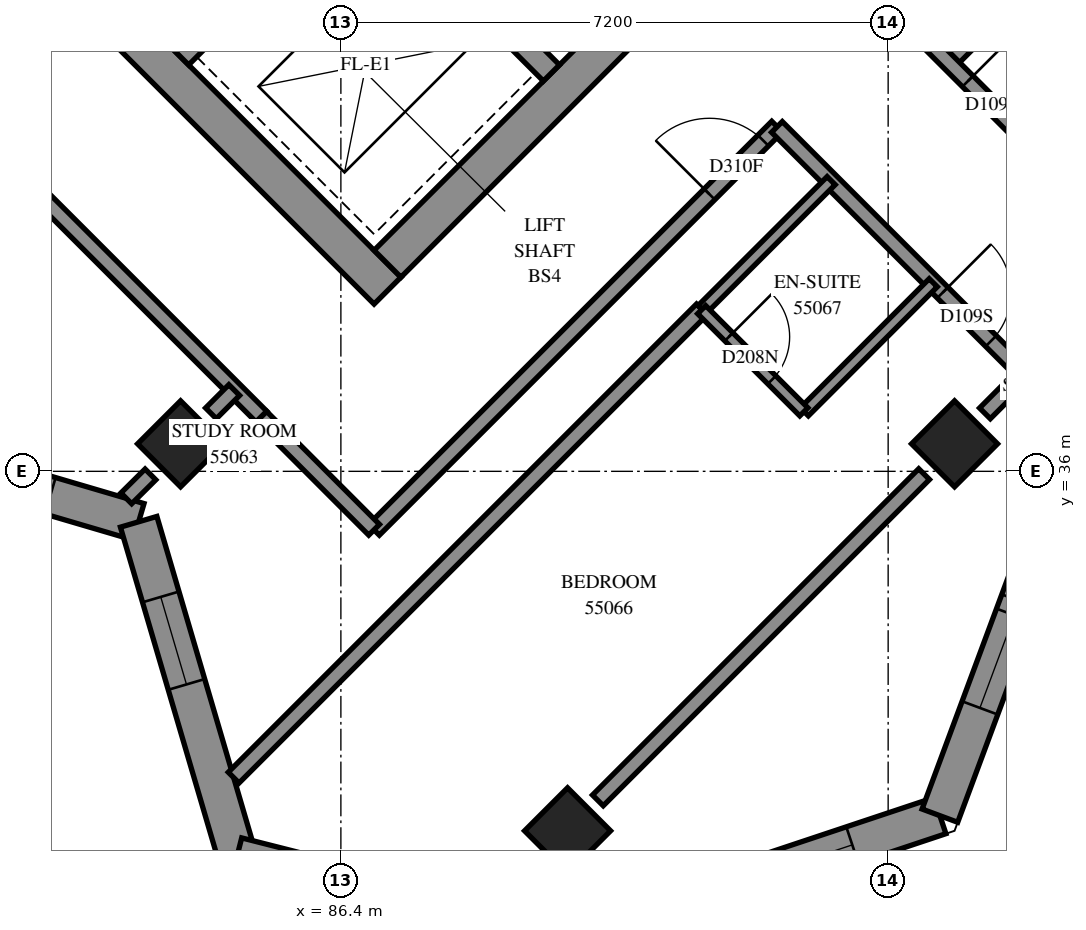
"""IFC4 building model, lengths in metres.
Left out: names, types, materials, properties, quantities, classifications, styles, units other than length and angle.
Written with IfcOpenShell. Run it as: python <this file> out.ifc"""

import sys

from ifc_helpers import new_model, si_unit, direction, frame, frame_2d, origin, origin_2d, place, context, subcontext, project, spatial, polyline, rectangle, outline, extrude, element, fill, save


model = new_model("IFC4")
c1 = context("Model", 3, precision=1e-05, world=origin(), true_north=direction((0.0, 1.0)))
c2 = subcontext(c1, "Body", "Model", "MODEL_VIEW")
j1 = project(units=[si_unit("LENGTHUNIT", "METRE"), si_unit("PLANEANGLEUNIT", "RADIAN")], contexts=[c1])
p1 = place(None, origin())
s1 = spatial("IfcSite", under=j1, at=p1, CompositionType="ELEMENT")
p2 = place(p1, origin())
s2 = spatial("IfcBuilding", under=s1, at=p2, CompositionType="ELEMENT")
p3 = place(p2, frame((0.0, 0.0, 203.2)))
s3 = spatial("IfcBuildingStorey", under=s2, at=p3, CompositionType="ELEMENT", Elevation=203.2)
for number, where, z_axis, x_axis in (
    (1, (84.291, 36.362, 0.0), (0.0, 0.0, 1.0), (0.707, -0.707, 0.0)),
    (2, (94.474, 36.362, 0.0), (0.0, 0.0, 1.0), (0.707, -0.707, 0.0)),
    (3, (89.382, 31.271, 0.0), (0.0, 0.0, 1.0), (0.707, -0.707, 0.0)),
):
    element("IfcColumn", number, at=place(p3, frame(where, z_axis=z_axis, x_axis=x_axis)), inside=s3, PredefinedType="COLUMN", context=c2, shape_type="SweptSolid", body=[
        extrude(rectangle(XDim=0.8, YDim=0.8, at=origin_2d()), origin(), (0.0, 0.0, 1.0), 3.1),
    ])
p4 = place(p3, frame((76.124, 49.267, -0.3), z_axis=(0.0, 0.0, 1.0), x_axis=(0.7071067812, -0.7071067812, 0.0)))
e4 = element("IfcWall", 4, at=p4, inside=s3, PredefinedType="SHEAR", context=c2, shape_type="SweptSolid", body=[
    extrude(rectangle(XDim=15.4, YDim=0.5, at=frame_2d((7.7, 0.0))), origin(), (0.0, 0.0, 1.0), 2.7),
])
p5 = place(p3, frame((87.013, 38.731, -0.3), z_axis=(0.0, 0.0, 1.0), x_axis=(0.7071067812, 0.7071067812, 0.0)))
e5 = element("IfcWall", 5, at=p5, inside=s3, PredefinedType="SHEAR", context=c2, shape_type="SweptSolid", body=[
    extrude(rectangle(XDim=14.4, YDim=0.5, at=frame_2d((7.2, 0.0))), origin(), (0.0, 0.0, 1.0), 2.7),
])
p6 = place(p5, frame((4.55, 0.0, 0.3)))
e6 = element("IfcOpeningElement", 6, at=p6, cuts=e5, PredefinedType="OPENING", context=c2, shape_type="SweptSolid", body=[
    extrude(rectangle(XDim=1.1, YDim=2.1, at=frame_2d((0.55, 1.05))), frame((0.0, 0.26, 0.0), z_axis=(0.0, -1.0, 0.0), x_axis=(1.0, 0.0, 0.0)), (0.0, 0.0, 1.0), 0.52),
])
p7 = place(p5, frame((11.35, 0.0, 0.3)))
e7 = element("IfcOpeningElement", 7, at=p7, cuts=e5, PredefinedType="OPENING", context=c2, shape_type="SweptSolid", body=[
    extrude(rectangle(XDim=1.1, YDim=2.1, at=frame_2d((0.55, 1.05))), frame((0.0, 0.26, 0.0), z_axis=(0.0, -1.0, 0.0), x_axis=(1.0, 0.0, 0.0)), (0.0, 0.0, 1.0), 0.52),
])
p8 = place(p3, frame((84.291, 41.453, 0.0), z_axis=(0.0, 0.0, 1.0), x_axis=(0.7071067812, 0.7071067812, 0.0)))
e8 = element("IfcWall", 8, at=p8, inside=s3, PredefinedType="SOLIDWALL", context=c2, shape_type="SweptSolid", body=[
    extrude(rectangle(XDim=3.3, YDim=0.3, at=frame_2d((1.65, 0.0))), origin(), (0.0, 0.0, 1.0), 3.1),
])
p9 = place(p3, frame((78.988, 51.423, 0.0), z_axis=(0.0, 0.0, 1.0), x_axis=(0.7071067812, -0.7071067812, 0.0)))
e9 = element("IfcWall", 9, at=p9, inside=s3, PredefinedType="SOLIDWALL", context=c2, shape_type="SweptSolid", body=[
    extrude(rectangle(XDim=14.4, YDim=0.3, at=frame_2d((7.2, 0.0))), origin(), (0.0, 0.0, 1.0), 3.1),
])
p10 = place(p9, frame((1.35, 0.0, 0.0)))
e10 = element("IfcOpeningElement", 10, at=p10, cuts=e9, PredefinedType="OPENING", context=c2, shape_type="SweptSolid", body=[
    extrude(rectangle(XDim=0.9, YDim=2.1, at=frame_2d((0.45, 1.05))), frame((0.0, 0.16, 0.0), z_axis=(0.0, -1.0, 0.0), x_axis=(1.0, 0.0, 0.0)), (0.0, 0.0, 1.0), 0.32),
])
p11 = place(p9, frame((4.95, 0.0, 0.0)))
e11 = element("IfcOpeningElement", 11, at=p11, cuts=e9, PredefinedType="OPENING", context=c2, shape_type="SweptSolid", body=[
    extrude(rectangle(XDim=0.9, YDim=2.1, at=frame_2d((0.45, 1.05))), frame((0.0, 0.16, 0.0), z_axis=(0.0, -1.0, 0.0), x_axis=(1.0, 0.0, 0.0)), (0.0, 0.0, 1.0), 0.32),
])
p12 = place(p9, frame((8.55, 0.0, 0.0)))
e12 = element("IfcOpeningElement", 12, at=p12, cuts=e9, PredefinedType="OPENING", context=c2, shape_type="SweptSolid", body=[
    extrude(rectangle(XDim=0.9, YDim=2.1, at=frame_2d((0.45, 1.05))), frame((0.0, 0.16, 0.0), z_axis=(0.0, -1.0, 0.0), x_axis=(1.0, 0.0, 0.0)), (0.0, 0.0, 1.0), 0.32),
])
p13 = place(p9, frame((12.05, 0.0, 0.0)))
e13 = element("IfcOpeningElement", 13, at=p13, cuts=e9, PredefinedType="OPENING", context=c2, shape_type="SweptSolid", body=[
    extrude(rectangle(XDim=1.1, YDim=2.1, at=frame_2d((0.55, 1.05))), frame((0.0, 0.16, 0.0), z_axis=(0.0, -1.0, 0.0), x_axis=(1.0, 0.0, 0.0)), (0.0, 0.0, 1.0), 0.32),
])
p14 = place(p3, frame((89.373, 29.834, 0.0), z_axis=(0.0, 0.0, 1.0), x_axis=(0.9486832981, 0.316227766, 0.0)))
e14 = element("IfcWall", 14, at=p14, inside=s3, PredefinedType="SOLIDWALL", context=c2, shape_type="SweptSolid", body=[
    extrude(outline(polyline([(-0.073, -0.25), (5.293, -0.25), (5.054, 0.25), (0.073, 0.25), (-0.073, -0.25)])), origin(), (0.0, 0.0, 1.0), 3.1),
])
p15 = place(p14, frame((1.159, 0.0, 0.45)))
e15 = element("IfcOpeningElement", 15, at=p15, cuts=e14, PredefinedType="OPENING", context=c2, shape_type="SweptSolid", body=[
    extrude(rectangle(XDim=1.3, YDim=2.5, at=frame_2d((0.65, 1.25))), frame((0.0, 0.26, 0.0), z_axis=(0.0, -1.0, 0.0), x_axis=(1.0, 0.0, 0.0)), (0.0, 0.0, 1.0), 0.52),
])
p16 = place(p14, frame((2.659, 0.0, 0.45)))
e16 = element("IfcOpeningElement", 16, at=p16, cuts=e14, PredefinedType="OPENING", context=c2, shape_type="SweptSolid", body=[
    extrude(rectangle(XDim=1.3, YDim=2.5, at=frame_2d((0.65, 1.25))), frame((0.0, 0.26, 0.0), z_axis=(0.0, -1.0, 0.0), x_axis=(1.0, 0.0, 0.0)), (0.0, 0.0, 1.0), 0.52),
])
p17 = place(p3, frame((94.281, 31.47, 0.0), z_axis=(0.0, 0.0, 1.0), x_axis=(0.3481903374, 0.9374238577, 0.0)))
e17 = element("IfcWall", 17, at=p17, inside=s3, PredefinedType="SOLIDWALL", context=c2, shape_type="SweptSolid", body=[
    extrude(outline(polyline([(-0.12, -0.25), (5.16, -0.25), (5.39, 0.25), (0.12, 0.25), (-0.12, -0.25)])), origin(), (0.0, 0.0, 1.0), 3.1),
])
p18 = place(p17, frame((1.512, 0.0, 0.45)))
e18 = element("IfcOpeningElement", 18, at=p18, cuts=e17, PredefinedType="OPENING", context=c2, shape_type="SweptSolid", body=[
    extrude(rectangle(XDim=1.3, YDim=2.5, at=frame_2d((0.65, 1.25))), frame((0.0, 0.26, 0.0), z_axis=(0.0, -1.0, 0.0), x_axis=(1.0, 0.0, 0.0)), (0.0, 0.0, 1.0), 0.52),
])
p19 = place(p17, frame((3.012, 0.0, 0.45)))
e19 = element("IfcOpeningElement", 19, at=p19, cuts=e17, PredefinedType="OPENING", context=c2, shape_type="SweptSolid", body=[
    extrude(rectangle(XDim=1.3, YDim=2.5, at=frame_2d((0.65, 1.25))), frame((0.0, 0.26, 0.0), z_axis=(0.0, -1.0, 0.0), x_axis=(1.0, 0.0, 0.0)), (0.0, 0.0, 1.0), 0.52),
])
p20 = place(p3, frame((79.338, 36.63, 0.0), z_axis=(0.0, 0.0, 1.0), x_axis=(0.9593974303, -0.2820577435, 0.0)))
e20 = element("IfcWall", 20, at=p20, inside=s3, PredefinedType="SOLIDWALL", context=c2, shape_type="SweptSolid", body=[
    extrude(outline(polyline([(-0.142, -0.25), (4.451, -0.25), (4.724, 0.25), (0.142, 0.25), (-0.142, -0.25)])), origin(), (0.0, 0.0, 1.0), 3.1),
])
p21 = place(p20, frame((0.575, 0.0, 0.45)))
e21 = element("IfcOpeningElement", 21, at=p21, cuts=e20, PredefinedType="OPENING", context=c2, shape_type="SweptSolid", body=[
    extrude(rectangle(XDim=1.3, YDim=2.5, at=frame_2d((0.65, 1.25))), frame((0.0, 0.26, 0.0), z_axis=(0.0, -1.0, 0.0), x_axis=(1.0, 0.0, 0.0)), (0.0, 0.0, 1.0), 0.52),
])
p22 = place(p20, frame((2.075, 0.0, 0.45)))
e22 = element("IfcOpeningElement", 22, at=p22, cuts=e20, PredefinedType="OPENING", context=c2, shape_type="SweptSolid", body=[
    extrude(rectangle(XDim=1.3, YDim=2.5, at=frame_2d((0.65, 1.25))), frame((0.0, 0.26, 0.0), z_axis=(0.0, -1.0, 0.0), x_axis=(1.0, 0.0, 0.0)), (0.0, 0.0, 1.0), 0.52),
])
p23 = place(p3, frame((83.74, 35.336, 0.0), z_axis=(0.0, 0.0, 1.0), x_axis=(0.2820577435, -0.9593974303, 0.0)))
e23 = element("IfcWall", 23, at=p23, inside=s3, PredefinedType="SOLIDWALL", context=c2, shape_type="SweptSolid", body=[
    extrude(outline(polyline([(0.136, -0.25), (4.73, -0.25), (4.445, 0.25), (-0.136, 0.25), (0.136, -0.25)])), origin(), (0.0, 0.0, 1.0), 3.1),
])
p24 = place(p23, frame((1.03, 0.0, 0.45)))
e24 = element("IfcOpeningElement", 24, at=p24, cuts=e23, PredefinedType="OPENING", context=c2, shape_type="SweptSolid", body=[
    extrude(rectangle(XDim=1.2, YDim=2.5, at=frame_2d((0.6, 1.25))), frame((0.0, 0.26, 0.0), z_axis=(0.0, -1.0, 0.0), x_axis=(1.0, 0.0, 0.0)), (0.0, 0.0, 1.0), 0.52),
])
p25 = place(p3, frame((85.034, 30.935, 0.0), z_axis=(0.0, 0.0, 1.0), x_axis=(0.9692704293, -0.2459976318, 0.0)))
e25 = element("IfcWall", 25, at=p25, inside=s3, PredefinedType="SOLIDWALL", context=c2, shape_type="SweptSolid", body=[
    extrude(outline(polyline([(-0.142, -0.25), (4.55, -0.25), (4.404, 0.25), (0.142, 0.25), (-0.142, -0.25)])), origin(), (0.0, 0.0, 1.0), 3.1),
])
p26 = place(p25, frame((2.107, 0.0, 0.45)))
e26 = element("IfcOpeningElement", 26, at=p26, cuts=e25, PredefinedType="OPENING", context=c2, shape_type="SweptSolid", body=[
    extrude(rectangle(XDim=1.2, YDim=2.5, at=frame_2d((0.6, 1.25))), frame((0.0, 0.26, 0.0), z_axis=(0.0, -1.0, 0.0), x_axis=(1.0, 0.0, 0.0)), (0.0, 0.0, 1.0), 0.52),
])
p27 = place(p3, frame((84.99, 31.971, 0.0), z_axis=(0.0, 0.0, 1.0), x_axis=(0.7071067812, 0.7071067812, 0.0)))
e27 = element("IfcWall", 27, at=p27, inside=s3, PredefinedType="PARTITIONING", context=c2, shape_type="SweptSolid", body=[
    extrude(rectangle(XDim=8.711, YDim=0.2, at=frame_2d((4.356, 0.0))), origin(), (0.0, 0.0, 1.0), 3.1),
])
p28 = place(p3, frame((86.835, 35.231, 0.0), z_axis=(0.0, 0.0, 1.0), x_axis=(0.7071067812, 0.7071067812, 0.0)))
e28 = element("IfcWall", 28, at=p28, inside=s3, PredefinedType="PARTITIONING", context=c2, shape_type="SweptSolid", body=[
    extrude(rectangle(XDim=7.501, YDim=0.2, at=frame_2d((3.751, 0.0))), origin(), (0.0, 0.0, 1.0), 3.1),
])
p29 = place(p28, frame((6.243, 0.0, 0.0)))
e29 = element("IfcOpeningElement", 29, at=p29, cuts=e28, PredefinedType="OPENING", context=c2, shape_type="SweptSolid", body=[
    extrude(rectangle(XDim=1.0, YDim=2.1, at=frame_2d((0.5, 1.05))), frame((0.0, 0.11, 0.0), z_axis=(0.0, -1.0, 0.0), x_axis=(1.0, 0.0, 0.0)), (0.0, 0.0, 1.0), 0.22),
])
p30 = place(p3, frame((80.522, 41.553, 0.0), z_axis=(0.0, 0.0, 1.0), x_axis=(0.7071067812, -0.7071067812, 0.0)))
e30 = element("IfcWall", 30, at=p30, inside=s3, PredefinedType="PARTITIONING", context=c2, shape_type="SweptSolid", body=[
    extrude(rectangle(XDim=6.836, YDim=0.2, at=frame_2d((3.418, 0.0))), origin(), (0.0, 0.0, 1.0), 3.1),
])
p31 = place(p3, frame((94.402, 41.382, 0.0), z_axis=(0.0, 0.0, 1.0), x_axis=(0.7072538072, 0.7069597246, 0.0)))
e31 = element("IfcWall", 31, at=p31, inside=s3, PredefinedType="PARTITIONING", context=c2, shape_type="SweptSolid", body=[
    extrude(rectangle(XDim=6.801, YDim=0.2, at=frame_2d((3.4, 0.0))), origin(), (0.0, 0.0, 1.0), 3.1),
])
p32 = place(p3, frame((89.781, 31.671, 0.0), z_axis=(0.0, 0.0, 1.0), x_axis=(0.7071067812, 0.7071067812, 0.0)))
e32 = element("IfcWall", 32, at=p32, inside=s3, PredefinedType="PARTITIONING", context=c2, shape_type="SweptSolid", body=[
    extrude(rectangle(XDim=6.07, YDim=0.2, at=frame_2d((3.035, 0.0))), origin(), (0.0, 0.0, 1.0), 2.6),
])
p33 = place(p3, frame((93.693, 42.085, 0.0), z_axis=(0.0, 0.0, 1.0), x_axis=(0.7071067812, -0.7071067812, 0.0)))
e33 = element("IfcWall", 33, at=p33, inside=s3, PredefinedType="PARTITIONING", context=c2, shape_type="SweptSolid", body=[
    extrude(rectangle(XDim=4.599, YDim=0.2, at=frame_2d((2.3, 0.0))), origin(), (0.0, 0.0, 1.0), 3.1),
])
p34 = place(p33, frame((1.349, 0.0, 0.0)))
e34 = element("IfcOpeningElement", 34, at=p34, cuts=e33, PredefinedType="OPENING", context=c2, shape_type="SweptSolid", body=[
    extrude(rectangle(XDim=0.9, YDim=2.1, at=frame_2d((0.45, 1.05))), frame((0.0, 0.11, 0.0), z_axis=(0.0, -1.0, 0.0), x_axis=(1.0, 0.0, 0.0)), (0.0, 0.0, 1.0), 0.22),
])
p35 = place(p3, frame((92.137, 40.531, 0.0), z_axis=(0.0, 0.0, 1.0), x_axis=(0.7071067812, -0.7071067812, 0.0)))
e35 = element("IfcWall", 35, at=p35, inside=s3, PredefinedType="PARTITIONING", context=c2, shape_type="SweptSolid", body=[
    extrude(rectangle(XDim=4.599, YDim=0.2, at=frame_2d((2.3, 0.0))), origin(), (0.0, 0.0, 1.0), 3.1),
])
p36 = place(p35, frame((3.083, 0.0, 0.0)))
e36 = element("IfcOpeningElement", 36, at=p36, cuts=e35, PredefinedType="OPENING", context=c2, shape_type="SweptSolid", body=[
    extrude(rectangle(XDim=0.9, YDim=2.1, at=frame_2d((0.45, 1.05))), frame((0.0, 0.11, 0.0), z_axis=(0.0, -1.0, 0.0), x_axis=(1.0, 0.0, 0.0)), (0.0, 0.0, 1.0), 0.22),
])
for number, where, z_axis, x_axis in (
    (37, (91.152, 38.128, 0.0), (0.0, 0.0, 1.0), (0.708, 0.707, 0.0)),
    (38, (92.497, 36.783, 0.0), (0.0, 0.0, 1.0), (0.707, 0.708, 0.0)),
):
    element("IfcWall", number, at=place(p3, frame(where, z_axis=z_axis, x_axis=x_axis)), inside=s3, PredefinedType="PARTITIONING", context=c2, shape_type="SweptSolid", body=[
        extrude(rectangle(XDim=2.4, YDim=0.15, at=frame_2d((1.2, 0.0))), origin(), (0.0, 0.0, 1.0), 3.1),
    ])
p37 = place(p3, frame((85.353, 36.717, 0.0), z_axis=(0.0, 0.0, 1.0), x_axis=(0.7066304548, -0.7075827869, 0.0)))
e39 = element("IfcWall", 39, at=p37, inside=s3, PredefinedType="PARTITIONING", context=c2, shape_type="SweptSolid", body=[
    extrude(rectangle(XDim=2.1, YDim=0.2, at=frame_2d((1.05, 0.0))), origin(), (0.0, 0.0, 1.0), 3.1),
])
p38 = place(p3, frame((91.147, 38.127, 0.0), z_axis=(0.0, 0.0, 1.0), x_axis=(0.7071067812, -0.7071067812, 0.0)))
e40 = element("IfcWall", 40, at=p38, inside=s3, PredefinedType="PARTITIONING", context=c2, shape_type="SweptSolid", body=[
    extrude(rectangle(XDim=1.901, YDim=0.15, at=frame_2d((0.95, 0.0))), origin(), (0.0, 0.0, 1.0), 3.1),
])
p39 = place(p38, frame((0.506, 0.0, 0.0)))
e41 = element("IfcOpeningElement", 41, at=p39, cuts=e40, PredefinedType="OPENING", context=c2, shape_type="SweptSolid", body=[
    extrude(rectangle(XDim=0.8, YDim=2.1, at=frame_2d((0.4, 1.05))), frame((0.0, 0.085, 0.0), z_axis=(0.0, -1.0, 0.0), x_axis=(1.0, 0.0, 0.0)), (0.0, 0.0, 1.0), 0.17),
])
p40 = place(p3, frame((94.874, 36.763, 0.0), z_axis=(0.0, 0.0, 1.0), x_axis=(0.7057430303, 0.7084679069, 0.0)))
e42 = element("IfcWall", 42, at=p40, inside=s3, PredefinedType="PARTITIONING", context=c2, shape_type="SweptSolid", body=[
    extrude(rectangle(XDim=0.734, YDim=0.2, at=frame_2d((0.367, 0.0))), origin(), (0.0, 0.0, 1.0), 2.6),
])
p41 = place(p3, frame((84.691, 36.763, 0.0), z_axis=(0.0, 0.0, 1.0), x_axis=(0.7071067812, 0.7071067812, 0.0)))
e43 = element("IfcWall", 43, at=p41, inside=s3, PredefinedType="PARTITIONING", context=c2, shape_type="SweptSolid", body=[
    extrude(rectangle(XDim=0.433, YDim=0.2, at=frame_2d((0.216, 0.0))), origin(), (0.0, 0.0, 1.0), 3.1),
])
p42 = place(p3, frame((83.577, 35.645, 0.0), z_axis=(0.0, 0.0, 1.0), x_axis=(0.709897886, 0.7043046155, 0.0)))
e44 = element("IfcWall", 44, at=p42, inside=s3, PredefinedType="PARTITIONING", context=c2, shape_type="SweptSolid", body=[
    extrude(rectangle(XDim=0.447, YDim=0.2, at=frame_2d((0.224, 0.0))), origin(), (0.0, 0.0, 1.0), 3.1),
])
p43 = place(p16, origin())
e45 = element("IfcWindow", 45, at=p43, inside=s3, PartitioningType="SINGLE_PANEL", PredefinedType="WINDOW", context=c2, shape_type="SweptSolid", body=[
    extrude(rectangle(XDim=1.3, YDim=2.5, at=frame_2d((0.65, 1.25))), frame((0.0, 0.18, 0.0), z_axis=(0.0, -1.0, 0.0), x_axis=(1.0, 0.0, 0.0)), (0.0, 0.0, 1.0), 0.06),
])
fill(e16, e45)
p44 = place(p18, origin())
e46 = element("IfcWindow", 46, at=p44, inside=s3, PartitioningType="SINGLE_PANEL", PredefinedType="WINDOW", context=c2, shape_type="SweptSolid", body=[
    extrude(rectangle(XDim=1.3, YDim=2.5, at=frame_2d((0.65, 1.25))), frame((0.0, 0.18, 0.0), z_axis=(0.0, -1.0, 0.0), x_axis=(1.0, 0.0, 0.0)), (0.0, 0.0, 1.0), 0.06),
])
fill(e18, e46)
p45 = place(p19, origin())
e47 = element("IfcWindow", 47, at=p45, inside=s3, PartitioningType="SINGLE_PANEL", PredefinedType="WINDOW", context=c2, shape_type="SweptSolid", body=[
    extrude(rectangle(XDim=1.3, YDim=2.5, at=frame_2d((0.65, 1.25))), frame((0.0, 0.18, 0.0), z_axis=(0.0, -1.0, 0.0), x_axis=(1.0, 0.0, 0.0)), (0.0, 0.0, 1.0), 0.06),
])
fill(e19, e47)
p46 = place(p22, origin())
e48 = element("IfcWindow", 48, at=p46, inside=s3, PartitioningType="SINGLE_PANEL", PredefinedType="WINDOW", context=c2, shape_type="SweptSolid", body=[
    extrude(rectangle(XDim=1.3, YDim=2.5, at=frame_2d((0.65, 1.25))), frame((0.0, 0.18, 0.0), z_axis=(0.0, -1.0, 0.0), x_axis=(1.0, 0.0, 0.0)), (0.0, 0.0, 1.0), 0.06),
])
fill(e22, e48)
p47 = place(p24, origin())
e49 = element("IfcWindow", 49, at=p47, inside=s3, PartitioningType="SINGLE_PANEL", PredefinedType="WINDOW", context=c2, shape_type="SweptSolid", body=[
    extrude(rectangle(XDim=1.2, YDim=2.5, at=frame_2d((0.6, 1.25))), frame((0.0, 0.18, 0.0), z_axis=(0.0, -1.0, 0.0), x_axis=(1.0, 0.0, 0.0)), (0.0, 0.0, 1.0), 0.06),
])
fill(e24, e49)
p48 = place(p29, origin())
e50 = element("IfcDoor", 50, at=p48, inside=s3, OperationType="SINGLE_SWING_RIGHT", PredefinedType="DOOR", context=c2, shape_type="SweptSolid", body=[
    extrude(rectangle(XDim=1.0, YDim=2.1, at=frame_2d((0.5, 1.05))), frame((0.0, 0.025, 0.0), z_axis=(0.0, -1.0, 0.0), x_axis=(1.0, 0.0, 0.0)), (0.0, 0.0, 1.0), 0.05),
])
fill(e29, e50)
p49 = place(p34, origin())
e51 = element("IfcDoor", 51, at=p49, inside=s3, OperationType="SINGLE_SWING_RIGHT", PredefinedType="DOOR", context=c2, shape_type="SweptSolid", body=[
    extrude(rectangle(XDim=0.9, YDim=2.1, at=frame_2d((0.45, 1.05))), frame((0.0, 0.025, 0.0), z_axis=(0.0, -1.0, 0.0), x_axis=(1.0, 0.0, 0.0)), (0.0, 0.0, 1.0), 0.05),
])
fill(e34, e51)
p50 = place(p36, origin())
e52 = element("IfcDoor", 52, at=p50, inside=s3, OperationType="SINGLE_SWING_LEFT", PredefinedType="DOOR", context=c2, shape_type="SweptSolid", body=[
    extrude(rectangle(XDim=0.9, YDim=2.1, at=frame_2d((0.45, 1.05))), frame((0.0, 0.025, 0.0), z_axis=(0.0, -1.0, 0.0), x_axis=(1.0, 0.0, 0.0)), (0.0, 0.0, 1.0), 0.05),
])
fill(e36, e52)
p51 = place(p39, origin())
e53 = element("IfcDoor", 53, at=p51, inside=s3, OperationType="SINGLE_SWING_RIGHT", PredefinedType="DOOR", context=c2, shape_type="SweptSolid", body=[
    extrude(rectangle(XDim=0.8, YDim=2.1, at=frame_2d((0.4, 1.05))), frame((0.0, 0.025, 0.0), z_axis=(0.0, -1.0, 0.0), x_axis=(1.0, 0.0, 0.0)), (0.0, 0.0, 1.0), 0.05),
])
fill(e41, e53)
save(model, sys.argv[1])
